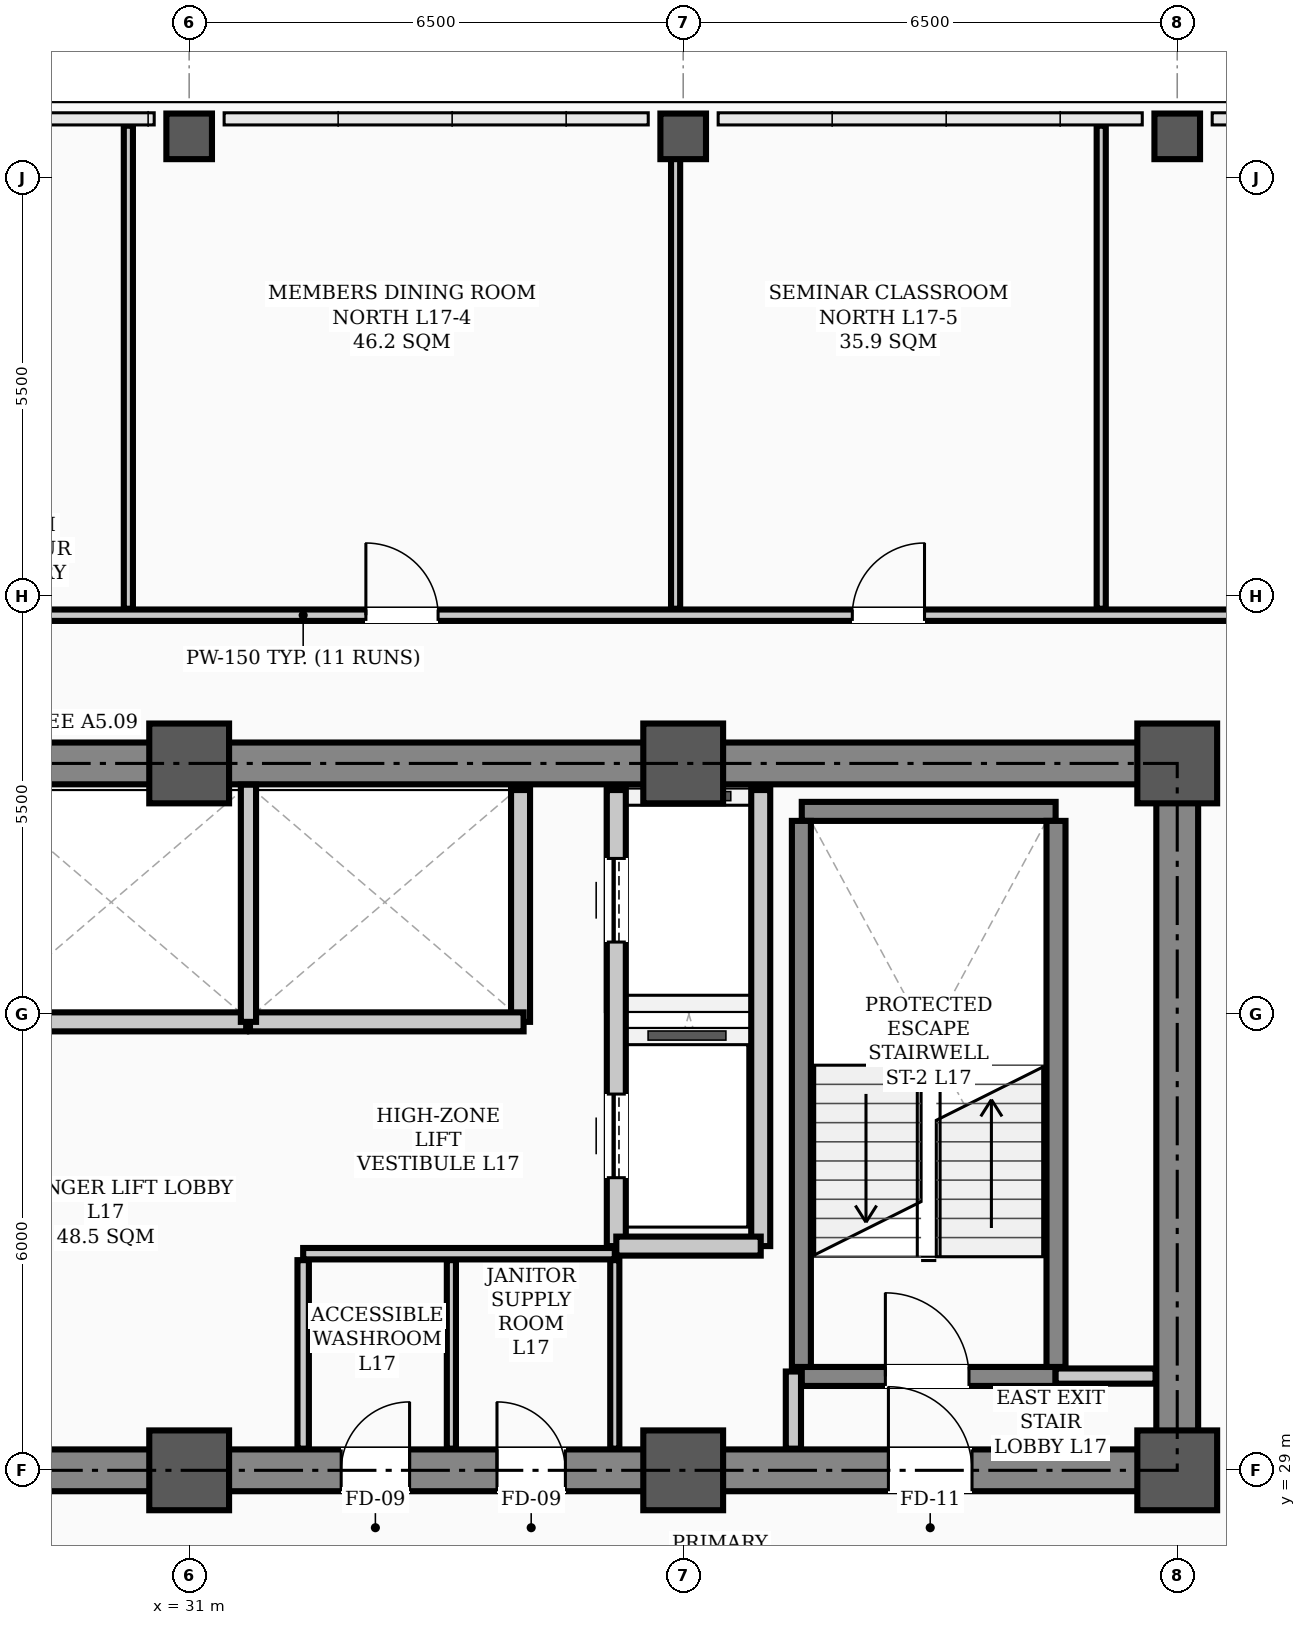
"""IFC4 building model, lengths in metres.
Left out: names, types, materials, properties, quantities, classifications, styles, units other than length and angle.
Written with IfcOpenShell. Run it as: python <this file> out.ifc"""

import sys

from ifc_helpers import new_model, si_unit, direction, frame, frame_2d, origin, origin_2d, place, context, subcontext, project, spatial, rectangle, hollow_rectangle, extrude, element, fill, save


model = new_model("IFC4")
c1 = context("Model", 3, precision=1e-05, world=origin(), true_north=direction((0.0, 1.0)))
c2 = subcontext(c1, "Body", "Model", "MODEL_VIEW")
j1 = project(units=[si_unit("LENGTHUNIT", "METRE"), si_unit("PLANEANGLEUNIT", "RADIAN")], contexts=[c1])
p1 = place(None, origin())
s1 = spatial("IfcSite", under=j1, at=p1, CompositionType="ELEMENT")
p2 = place(p1, origin())
s2 = spatial("IfcBuilding", under=s1, at=p2, CompositionType="ELEMENT")
p3 = place(p2, frame((0.0, 0.0, 69.4)))
s3 = spatial("IfcBuildingStorey", under=s2, at=p3, CompositionType="ELEMENT", Elevation=69.4)
for number, where, z_axis, x_axis in (
    (1, (31.0, 29.0, 0.0), (0.0, 0.0, 1.0), (1.0, 0.0, 0.0)),
    (2, (31.0, 38.3, 0.0), (0.0, 0.0, 1.0), (1.0, 0.0, 0.0)),
    (3, (37.5, 29.0, 0.0), (0.0, 0.0, 1.0), (1.0, 0.0, 0.0)),
    (4, (37.5, 38.3, 0.0), (0.0, 0.0, 1.0), (1.0, 0.0, 0.0)),
    (5, (44.0, 29.0, 0.0), (0.0, 0.0, 1.0), (1.0, 0.0, 0.0)),
    (6, (44.0, 38.3, 0.0), (0.0, 0.0, 1.0), (1.0, 0.0, 0.0)),
):
    element("IfcColumn", number, at=place(p3, frame(where, z_axis=z_axis, x_axis=x_axis)), inside=s3, PredefinedType="COLUMN", context=c2, shape_type="SweptSolid", body=[
        extrude(hollow_rectangle(XDim=1.05, YDim=1.05, WallThickness=0.038, InnerFilletRadius=0.019, OuterFilletRadius=0.057, at=origin_2d()), origin(), (0.0, 0.0, 1.0), 3.9),
    ])
for number, where, z_axis, x_axis in (
    (7, (31.0, 46.55, 0.0), (0.0, 0.0, 1.0), (1.0, 0.0, 0.0)),
    (8, (37.5, 46.55, 0.0), (0.0, 0.0, 1.0), (1.0, 0.0, 0.0)),
    (9, (44.0, 46.55, 0.0), (0.0, 0.0, 1.0), (1.0, 0.0, 0.0)),
):
    element("IfcColumn", number, at=place(p3, frame(where, z_axis=z_axis, x_axis=x_axis)), inside=s3, PredefinedType="COLUMN", context=c2, shape_type="SweptSolid", body=[
        extrude(hollow_rectangle(XDim=0.6, YDim=0.6, WallThickness=0.026, InnerFilletRadius=0.013, OuterFilletRadius=0.039, at=origin_2d()), origin(), (0.0, 0.0, 1.0), 3.9),
    ])
p4 = place(p3, frame((13.5, 29.0, 0.0), z_axis=(0.0, 0.0, 1.0), x_axis=(1.0, 0.0, 0.0)))
e10 = element("IfcWall", 10, at=p4, inside=s3, PredefinedType="SHEAR", context=c2, shape_type="SweptSolid", body=[
    extrude(rectangle(XDim=30.5, YDim=0.55, at=frame_2d((15.25, 0.0))), origin(), (0.0, 0.0, 1.0), 3.72),
])
p5 = place(p4, frame((1.75, 0.0, 0.0)))
e11 = element("IfcOpeningElement", 11, at=p5, cuts=e10, PredefinedType="OPENING", context=c2, shape_type="SweptSolid", body=[
    extrude(rectangle(XDim=1.1, YDim=2.08, at=frame_2d((0.55, 1.04))), frame((0.0, 0.285, 0.0), z_axis=(0.0, -1.0, 0.0), x_axis=(1.0, 0.0, 0.0)), (0.0, 0.0, 1.0), 0.57),
])
p6 = place(p4, frame((26.7, 0.0, 0.0)))
e12 = element("IfcOpeningElement", 12, at=p6, cuts=e10, PredefinedType="OPENING", context=c2, shape_type="SweptSolid", body=[
    extrude(rectangle(XDim=1.1, YDim=2.08, at=frame_2d((0.55, 1.04))), frame((0.0, 0.285, 0.0), z_axis=(0.0, -1.0, 0.0), x_axis=(1.0, 0.0, 0.0)), (0.0, 0.0, 1.0), 0.57),
])
p7 = place(p4, frame((6.8, 0.0, 0.0)))
e13 = element("IfcOpeningElement", 13, at=p7, cuts=e10, PredefinedType="OPENING", context=c2, shape_type="SweptSolid", body=[
    extrude(rectangle(XDim=1.1, YDim=2.08, at=frame_2d((0.55, 1.04))), frame((0.0, 0.285, 0.0), z_axis=(0.0, -1.0, 0.0), x_axis=(1.0, 0.0, 0.0)), (0.0, 0.0, 1.0), 0.57),
])
p8 = place(p4, frame((13.2, 0.0, 0.0)))
e14 = element("IfcOpeningElement", 14, at=p8, cuts=e10, PredefinedType="OPENING", context=c2, shape_type="SweptSolid", body=[
    extrude(rectangle(XDim=1.6, YDim=2.08, at=frame_2d((0.8, 1.04))), frame((0.0, 0.285, 0.0), z_axis=(0.0, -1.0, 0.0), x_axis=(1.0, 0.0, 0.0)), (0.0, 0.0, 1.0), 0.57),
])
p9 = place(p4, frame((19.5, 0.0, 0.0)))
e15 = element("IfcOpeningElement", 15, at=p9, cuts=e10, PredefinedType="OPENING", context=c2, shape_type="SweptSolid", body=[
    extrude(rectangle(XDim=0.9, YDim=2.08, at=frame_2d((0.45, 1.04))), frame((0.0, 0.285, 0.0), z_axis=(0.0, -1.0, 0.0), x_axis=(1.0, 0.0, 0.0)), (0.0, 0.0, 1.0), 0.57),
])
p10 = place(p4, frame((21.55, 0.0, 0.0)))
e16 = element("IfcOpeningElement", 16, at=p10, cuts=e10, PredefinedType="OPENING", context=c2, shape_type="SweptSolid", body=[
    extrude(rectangle(XDim=0.9, YDim=2.08, at=frame_2d((0.45, 1.04))), frame((0.0, 0.285, 0.0), z_axis=(0.0, -1.0, 0.0), x_axis=(1.0, 0.0, 0.0)), (0.0, 0.0, 1.0), 0.57),
])
p11 = place(p3, frame((13.5, 38.3, 0.0), z_axis=(0.0, 0.0, 1.0), x_axis=(1.0, 0.0, 0.0)))
e17 = element("IfcWall", 17, at=p11, inside=s3, PredefinedType="SHEAR", context=c2, shape_type="SweptSolid", body=[
    extrude(rectangle(XDim=30.5, YDim=0.55, at=frame_2d((15.25, 0.0))), origin(), (0.0, 0.0, 1.0), 3.72),
])
p12 = place(p3, frame((44.0, 29.35, 0.0), z_axis=(0.0, 0.0, 1.0), x_axis=(0.0, 1.0, 0.0)))
e18 = element("IfcWall", 18, at=p12, inside=s3, PredefinedType="SHEAR", context=c2, shape_type="SweptSolid", body=[
    extrude(rectangle(XDim=8.6, YDim=0.55, at=frame_2d((4.3, 0.0))), origin(), (0.0, 0.0, 1.0), 3.72),
])
p13 = place(p3, frame((39.06, 30.235, 0.0), z_axis=(0.0, 0.0, 1.0), x_axis=(1.0, 0.0, 0.0)))
e19 = element("IfcWall", 19, at=p13, inside=s3, PredefinedType="STANDARD", context=c2, shape_type="SweptSolid", body=[
    extrude(rectangle(XDim=3.34, YDim=0.25, at=frame_2d((1.67, 0.0))), origin(), (0.0, 0.0, 1.0), 3.72),
])
p14 = place(p13, frame((1.1, 0.0, 0.0)))
e20 = element("IfcOpeningElement", 20, at=p14, cuts=e19, PredefinedType="OPENING", context=c2, shape_type="SweptSolid", body=[
    extrude(rectangle(XDim=1.1, YDim=2.08, at=frame_2d((0.55, 1.04))), frame((0.0, 0.135, 0.0), z_axis=(0.0, -1.0, 0.0), x_axis=(1.0, 0.0, 0.0)), (0.0, 0.0, 1.0), 0.27),
])
p15 = place(p3, frame((39.06, 37.669, 0.0), z_axis=(0.0, 0.0, 1.0), x_axis=(1.0, 0.0, 0.0)))
e21 = element("IfcWall", 21, at=p15, inside=s3, PredefinedType="STANDARD", context=c2, shape_type="SweptSolid", body=[
    extrude(rectangle(XDim=3.34, YDim=0.25, at=frame_2d((1.67, 0.0))), origin(), (0.0, 0.0, 1.0), 3.72),
])
for number, where, z_axis, x_axis in (
    (22, (39.055, 30.36, 0.0), (0.0, 0.0, 1.0), (0.0, 1.0, 0.0)),
    (23, (42.405, 30.36, 0.0), (0.0, 0.0, 1.0), (0.0, 1.0, 0.0)),
):
    element("IfcWall", number, at=place(p3, frame(where, z_axis=z_axis, x_axis=x_axis)), inside=s3, PredefinedType="STANDARD", context=c2, shape_type="SweptSolid", body=[
        extrude(rectangle(XDim=7.184, YDim=0.25, at=frame_2d((3.592, 0.0))), origin(), (0.0, 0.0, 1.0), 3.72),
    ])
p16 = place(p3, frame((36.62, 31.95, 0.0), z_axis=(0.0, 0.0, 1.0), x_axis=(0.0, 1.0, 0.0)))
e24 = element("IfcWall", 24, at=p16, inside=s3, PredefinedType="STANDARD", context=c2, shape_type="SweptSolid", body=[
    extrude(rectangle(XDim=6.0, YDim=0.25, at=frame_2d((3.0, 0.0))), origin(), (0.0, 0.0, 1.0), 3.3),
])
p17 = place(p16, frame((0.9, 0.0, 0.0)))
e25 = element("IfcOpeningElement", 25, at=p17, cuts=e24, PredefinedType="OPENING", context=c2, shape_type="SweptSolid", body=[
    extrude(rectangle(XDim=1.1, YDim=2.08, at=frame_2d((0.55, 1.04))), frame((0.0, 0.135, 0.0), z_axis=(0.0, -1.0, 0.0), x_axis=(1.0, 0.0, 0.0)), (0.0, 0.0, 1.0), 0.27),
])
p18 = place(p16, frame((4.0, 0.0, 0.0)))
e26 = element("IfcOpeningElement", 26, at=p18, cuts=e24, PredefinedType="OPENING", context=c2, shape_type="SweptSolid", body=[
    extrude(rectangle(XDim=1.1, YDim=2.08, at=frame_2d((0.55, 1.04))), frame((0.0, 0.135, 0.0), z_axis=(0.0, -1.0, 0.0), x_axis=(1.0, 0.0, 0.0)), (0.0, 0.0, 1.0), 0.27),
])
p19 = place(p3, frame((38.52, 31.95, 0.0), z_axis=(0.0, 0.0, 1.0), x_axis=(0.0, 1.0, 0.0)))
e27 = element("IfcWall", 27, at=p19, inside=s3, PredefinedType="STANDARD", context=c2, shape_type="SweptSolid", body=[
    extrude(rectangle(XDim=6.0, YDim=0.25, at=frame_2d((3.0, 0.0))), origin(), (0.0, 0.0, 1.0), 3.3),
])
p20 = place(p3, frame((36.62, 31.95, 0.0), z_axis=(0.0, 0.0, 1.0), x_axis=(1.0, 0.0, 0.0)))
e28 = element("IfcWall", 28, at=p20, inside=s3, PredefinedType="STANDARD", context=c2, shape_type="SweptSolid", body=[
    extrude(rectangle(XDim=1.9, YDim=0.25, at=frame_2d((0.95, 0.0))), origin(), (0.0, 0.0, 1.0), 3.48),
])
p21 = place(p3, frame((35.36, 34.9, 0.0), z_axis=(0.0, 0.0, 1.0), x_axis=(0.0, 1.0, 0.0)))
e29 = element("IfcWall", 29, at=p21, inside=s3, PredefinedType="STANDARD", context=c2, shape_type="SweptSolid", body=[
    extrude(rectangle(XDim=3.05, YDim=0.25, at=frame_2d((1.525, 0.0))), origin(), (0.0, 0.0, 1.0), 3.3),
])
p22 = place(p3, frame((28.2, 34.9, 0.0), z_axis=(0.0, 0.0, 1.0), x_axis=(1.0, 0.0, 0.0)))
e30 = element("IfcWall", 30, at=p22, inside=s3, PredefinedType="STANDARD", context=c2, shape_type="SweptSolid", body=[
    extrude(rectangle(XDim=3.55, YDim=0.25, at=frame_2d((1.775, 0.0))), origin(), (0.0, 0.0, 1.0), 3.72),
])
p23 = place(p3, frame((31.8, 34.9, 0.0), z_axis=(0.0, 0.0, 1.0), x_axis=(1.0, 0.0, 0.0)))
e31 = element("IfcWall", 31, at=p23, inside=s3, PredefinedType="STANDARD", context=c2, shape_type="SweptSolid", body=[
    extrude(rectangle(XDim=3.6, YDim=0.25, at=frame_2d((1.8, 0.0))), origin(), (0.0, 0.0, 1.0), 3.72),
])
p24 = place(p3, frame((42.4, 30.24, 0.0), z_axis=(0.0, 0.0, 1.0), x_axis=(1.0, 0.0, 0.0)))
e32 = element("IfcWall", 32, at=p24, inside=s3, PredefinedType="STANDARD", context=c2, shape_type="SweptSolid", body=[
    extrude(rectangle(XDim=1.315, YDim=0.2, at=frame_2d((0.658, 0.0))), origin(), (0.0, 0.0, 1.0), 3.1),
])
p25 = place(p3, frame((32.5, 31.85, 0.0), z_axis=(0.0, 0.0, 1.0), x_axis=(1.0, 0.0, 0.0)))
e33 = element("IfcWall", 33, at=p25, inside=s3, PredefinedType="PARTITIONING", context=c2, shape_type="SweptSolid", body=[
    extrude(rectangle(XDim=4.1, YDim=0.15, at=frame_2d((2.05, 0.0))), origin(), (0.0, 0.0, 1.0), 3.72),
])
p26 = place(p3, frame((7.81, 40.25, 0.0), z_axis=(0.0, 0.0, 1.0), x_axis=(1.0, 0.0, 0.0)))
e34 = element("IfcWall", 34, at=p26, inside=s3, PredefinedType="PARTITIONING", context=c2, shape_type="SweptSolid", body=[
    extrude(rectangle(XDim=49.38, YDim=0.15, at=frame_2d((24.69, 0.0))), origin(), (0.0, 0.0, 1.0), 3.1),
])
p27 = place(p26, frame((3.73, 0.0, 0.0)))
e35 = element("IfcOpeningElement", 35, at=p27, cuts=e34, PredefinedType="OPENING", context=c2, shape_type="SweptSolid", body=[
    extrude(rectangle(XDim=0.95, YDim=2.08, at=frame_2d((0.475, 1.04))), frame((0.0, 0.085, 0.0), z_axis=(0.0, -1.0, 0.0), x_axis=(1.0, 0.0, 0.0)), (0.0, 0.0, 1.0), 0.17),
])
p28 = place(p26, frame((11.015, 0.0, 0.0)))
e36 = element("IfcOpeningElement", 36, at=p28, cuts=e34, PredefinedType="OPENING", context=c2, shape_type="SweptSolid", body=[
    extrude(rectangle(XDim=0.95, YDim=2.08, at=frame_2d((0.475, 1.04))), frame((0.0, 0.085, 0.0), z_axis=(0.0, -1.0, 0.0), x_axis=(1.0, 0.0, 0.0)), (0.0, 0.0, 1.0), 0.17),
])
p29 = place(p26, frame((18.215, 0.0, 0.0)))
e37 = element("IfcOpeningElement", 37, at=p29, cuts=e34, PredefinedType="OPENING", context=c2, shape_type="SweptSolid", body=[
    extrude(rectangle(XDim=0.95, YDim=2.08, at=frame_2d((0.475, 1.04))), frame((0.0, 0.085, 0.0), z_axis=(0.0, -1.0, 0.0), x_axis=(1.0, 0.0, 0.0)), (0.0, 0.0, 1.0), 0.17),
])
p30 = place(p26, frame((25.515, 0.0, 0.0)))
e38 = element("IfcOpeningElement", 38, at=p30, cuts=e34, PredefinedType="OPENING", context=c2, shape_type="SweptSolid", body=[
    extrude(rectangle(XDim=0.95, YDim=2.08, at=frame_2d((0.475, 1.04))), frame((0.0, 0.085, 0.0), z_axis=(0.0, -1.0, 0.0), x_axis=(1.0, 0.0, 0.0)), (0.0, 0.0, 1.0), 0.17),
])
p31 = place(p26, frame((31.915, 0.0, 0.0)))
e39 = element("IfcOpeningElement", 39, at=p31, cuts=e34, PredefinedType="OPENING", context=c2, shape_type="SweptSolid", body=[
    extrude(rectangle(XDim=0.95, YDim=2.08, at=frame_2d((0.475, 1.04))), frame((0.0, 0.085, 0.0), z_axis=(0.0, -1.0, 0.0), x_axis=(1.0, 0.0, 0.0)), (0.0, 0.0, 1.0), 0.17),
])
p32 = place(p26, frame((37.2, 0.0, 0.0)))
e40 = element("IfcOpeningElement", 40, at=p32, cuts=e34, PredefinedType="OPENING", context=c2, shape_type="SweptSolid", body=[
    extrude(rectangle(XDim=0.95, YDim=2.08, at=frame_2d((0.475, 1.04))), frame((0.0, 0.085, 0.0), z_axis=(0.0, -1.0, 0.0), x_axis=(1.0, 0.0, 0.0)), (0.0, 0.0, 1.0), 0.17),
])
p33 = place(p3, frame((38.95, 29.285, 0.0), z_axis=(0.0, 0.0, 1.0), x_axis=(0.0, 1.0, 0.0)))
e41 = element("IfcWall", 41, at=p33, inside=s3, PredefinedType="STANDARD", context=c2, shape_type="SweptSolid", body=[
    extrude(rectangle(XDim=1.015, YDim=0.2, at=frame_2d((0.508, 0.0))), origin(), (0.0, 0.0, 1.0), 3.3),
])
p34 = place(p3, frame((32.5, 29.285, 0.0), z_axis=(0.0, 0.0, 1.0), x_axis=(0.0, 1.0, 0.0)))
e42 = element("IfcWall", 42, at=p34, inside=s3, PredefinedType="PARTITIONING", context=c2, shape_type="SweptSolid", body=[
    extrude(rectangle(XDim=2.48, YDim=0.15, at=frame_2d((1.24, 0.0))), origin(), (0.0, 0.0, 1.0), 3.3),
])
for number, where, z_axis, x_axis in (
    (43, (36.6, 29.285, 0.0), (0.0, 0.0, 1.0), (0.0, 1.0, 0.0)),
    (44, (34.45, 29.285, 0.0), (0.0, 0.0, 1.0), (0.0, 1.0, 0.0)),
):
    element("IfcWall", number, at=place(p3, frame(where, z_axis=z_axis, x_axis=x_axis)), inside=s3, PredefinedType="PARTITIONING", context=c2, shape_type="SweptSolid", body=[
        extrude(rectangle(XDim=2.48, YDim=0.12, at=frame_2d((1.24, 0.0))), origin(), (0.0, 0.0, 1.0), 3.3),
    ])
p35 = place(p3, frame((30.2, 40.335, 0.0), z_axis=(0.0, 0.0, 1.0), x_axis=(0.0, 1.0, 0.0)))
e45 = element("IfcWall", 45, at=p35, inside=s3, PredefinedType="PARTITIONING", context=c2, shape_type="SweptSolid", body=[
    extrude(rectangle(XDim=6.355, YDim=0.12, at=frame_2d((3.177, 0.0))), origin(), (0.0, 0.0, 1.0), 3.212),
])
p36 = place(p3, frame((37.4, 40.335, 0.0), z_axis=(0.0, 0.0, 1.0), x_axis=(0.0, 1.0, 0.0)))
e46 = element("IfcWall", 46, at=p36, inside=s3, PredefinedType="PARTITIONING", context=c2, shape_type="SweptSolid", body=[
    extrude(rectangle(XDim=6.355, YDim=0.12, at=frame_2d((3.177, 0.0))), origin(), (0.0, 0.0, 1.0), 3.1),
])
p37 = place(p3, frame((43.0, 40.335, 0.0), z_axis=(0.0, 0.0, 1.0), x_axis=(0.0, 1.0, 0.0)))
e47 = element("IfcWall", 47, at=p37, inside=s3, PredefinedType="PARTITIONING", context=c2, shape_type="SweptSolid", body=[
    extrude(rectangle(XDim=6.355, YDim=0.12, at=frame_2d((3.177, 0.0))), origin(), (0.0, 0.0, 1.0), 3.212),
])
p38 = place(p3, frame((31.78, 34.9, 0.0), z_axis=(0.0, 0.0, 1.0), x_axis=(0.0, 1.0, 0.0)))
e48 = element("IfcWall", 48, at=p38, inside=s3, PredefinedType="STANDARD", context=c2, shape_type="SweptSolid", body=[
    extrude(rectangle(XDim=3.12, YDim=0.2, at=frame_2d((1.56, 0.0))), origin(), (0.0, 0.0, 1.0), 3.3),
])
p39 = place(p14, origin())
e49 = element("IfcDoor", 49, at=p39, inside=s3, OperationType="SINGLE_SWING_LEFT", PredefinedType="DOOR", context=c2, shape_type="SweptSolid", body=[
    extrude(rectangle(XDim=1.1, YDim=2.08, at=frame_2d((0.55, 1.04))), frame((0.0, 0.025, 0.0), z_axis=(0.0, -1.0, 0.0), x_axis=(1.0, 0.0, 0.0)), (0.0, 0.0, 1.0), 0.05),
])
fill(e20, e49)
p40 = place(p6, origin())
e50 = element("IfcDoor", 50, at=p40, inside=s3, OperationType="SINGLE_SWING_LEFT", PredefinedType="DOOR", context=c2, shape_type="SweptSolid", body=[
    extrude(rectangle(XDim=1.1, YDim=2.08, at=frame_2d((0.55, 1.04))), frame((0.0, 0.025, 0.0), z_axis=(0.0, -1.0, 0.0), x_axis=(1.0, 0.0, 0.0)), (0.0, 0.0, 1.0), 0.05),
])
fill(e12, e50)
p41 = place(p9, origin())
e51 = element("IfcDoor", 51, at=p41, inside=s3, OperationType="SINGLE_SWING_RIGHT", PredefinedType="DOOR", context=c2, shape_type="SweptSolid", body=[
    extrude(rectangle(XDim=0.9, YDim=2.08, at=frame_2d((0.45, 1.04))), frame((0.0, 0.025, 0.0), z_axis=(0.0, -1.0, 0.0), x_axis=(1.0, 0.0, 0.0)), (0.0, 0.0, 1.0), 0.05),
])
fill(e15, e51)
p42 = place(p10, origin())
e52 = element("IfcDoor", 52, at=p42, inside=s3, OperationType="SINGLE_SWING_LEFT", PredefinedType="DOOR", context=c2, shape_type="SweptSolid", body=[
    extrude(rectangle(XDim=0.9, YDim=2.08, at=frame_2d((0.45, 1.04))), frame((0.0, 0.025, 0.0), z_axis=(0.0, -1.0, 0.0), x_axis=(1.0, 0.0, 0.0)), (0.0, 0.0, 1.0), 0.05),
])
fill(e16, e52)
p43 = place(p30, origin())
e53 = element("IfcDoor", 53, at=p43, inside=s3, OperationType="SINGLE_SWING_LEFT", PredefinedType="DOOR", context=c2, shape_type="SweptSolid", body=[
    extrude(rectangle(XDim=0.95, YDim=2.08, at=frame_2d((0.475, 1.04))), frame((0.0, 0.025, 0.0), z_axis=(0.0, -1.0, 0.0), x_axis=(1.0, 0.0, 0.0)), (0.0, 0.0, 1.0), 0.05),
])
fill(e38, e53)
p44 = place(p31, origin())
e54 = element("IfcDoor", 54, at=p44, inside=s3, OperationType="SINGLE_SWING_RIGHT", PredefinedType="DOOR", context=c2, shape_type="SweptSolid", body=[
    extrude(rectangle(XDim=0.95, YDim=2.08, at=frame_2d((0.475, 1.04))), frame((0.0, 0.025, 0.0), z_axis=(0.0, -1.0, 0.0), x_axis=(1.0, 0.0, 0.0)), (0.0, 0.0, 1.0), 0.05),
])
fill(e39, e54)
p45 = place(p17, origin())
e55 = element("IfcDoor", 55, at=p45, inside=s3, OperationType="SLIDING_TO_LEFT", PredefinedType="DOOR", context=c2, shape_type="SweptSolid", body=[
    extrude(rectangle(XDim=1.1, YDim=2.08, at=frame_2d((0.55, 1.04))), frame((0.0, 0.025, 0.0), z_axis=(0.0, -1.0, 0.0), x_axis=(1.0, 0.0, 0.0)), (0.0, 0.0, 1.0), 0.05),
])
fill(e25, e55)
p46 = place(p18, origin())
e56 = element("IfcDoor", 56, at=p46, inside=s3, OperationType="SLIDING_TO_LEFT", PredefinedType="DOOR", context=c2, shape_type="SweptSolid", body=[
    extrude(rectangle(XDim=1.1, YDim=2.08, at=frame_2d((0.55, 1.04))), frame((0.0, 0.025, 0.0), z_axis=(0.0, -1.0, 0.0), x_axis=(1.0, 0.0, 0.0)), (0.0, 0.0, 1.0), 0.05),
])
fill(e26, e56)
save(model, sys.argv[1])
